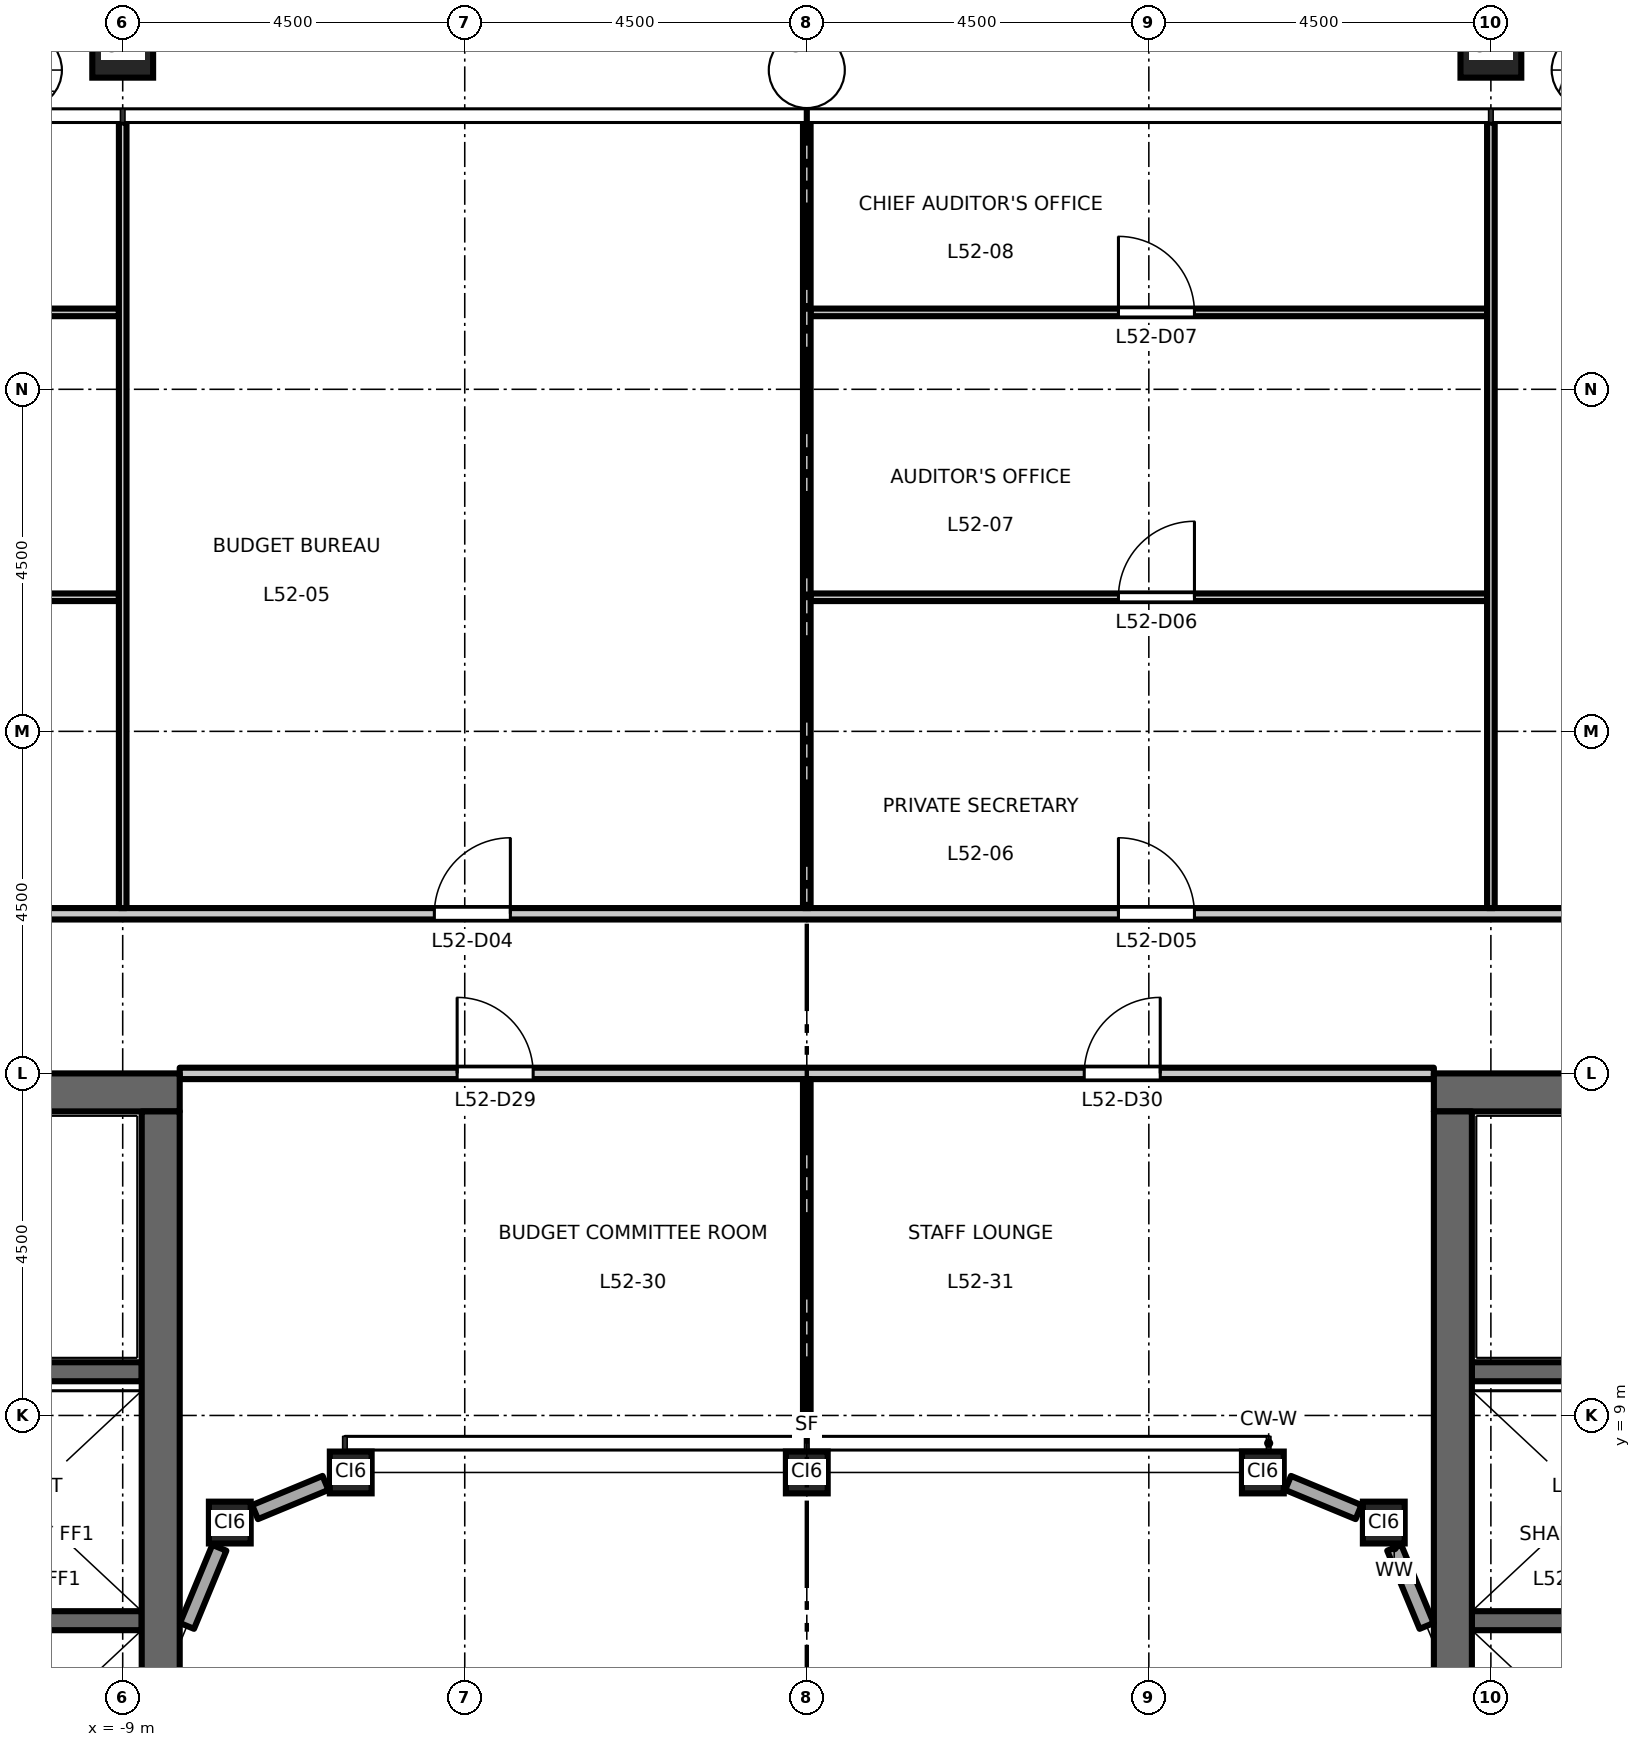
"""IFC4 building model, lengths in metres.
Left out: names, types, materials, properties, quantities, classifications, styles, units other than length and angle.
Written with IfcOpenShell. Run it as: python <this file> out.ifc"""

import sys

from ifc_helpers import new_model, si_unit, direction, frame, frame_2d, origin, origin_2d, place, context, subcontext, project, spatial, rectangle, hollow_rectangle, extrude, element, fill, save


model = new_model("IFC4")
c1 = context("Model", 3, precision=1e-05, world=origin(), true_north=direction((0.0, 1.0)))
c2 = subcontext(c1, "Body", "Model", "MODEL_VIEW")
j1 = project(units=[si_unit("LENGTHUNIT", "METRE"), si_unit("PLANEANGLEUNIT", "RADIAN")], contexts=[c1])
p1 = place(None, origin())
s1 = spatial("IfcSite", under=j1, at=p1, CompositionType="ELEMENT")
p2 = place(p1, origin())
s2 = spatial("IfcBuilding", under=s1, at=p2, CompositionType="ELEMENT")
p3 = place(p2, frame((0.0, 0.0, 242.2)))
s3 = spatial("IfcBuildingStorey", under=s2, at=p3, CompositionType="ELEMENT", Elevation=242.2)
for number, where, z_axis, x_axis in (
    (1, (9.0, 27.0, 0.0), (0.0, 0.0, 1.0), (1.0, 0.0, 0.0)),
    (2, (0.0, 27.0, 0.0), (0.0, 0.0, 1.0), (1.0, 0.0, 0.0)),
    (3, (-9.0, 27.0, 0.0), (0.0, 0.0, 1.0), (1.0, 0.0, 0.0)),
):
    element("IfcColumn", number, at=place(p3, frame(where, z_axis=z_axis, x_axis=x_axis)), inside=s3, PredefinedType="COLUMN", context=c2, shape_type="SweptSolid", body=[
        extrude(hollow_rectangle(XDim=0.8, YDim=0.8, WallThickness=0.045, at=origin_2d()), origin(), (0.0, 0.0, 1.0), 4.5),
    ])
for number, where, z_axis, x_axis in (
    (4, (-7.591, 7.591, 0.0), (0.0, 0.0, 1.0), (1.0, 0.0, 0.0)),
    (5, (-6.0, 8.25, 0.0), (0.0, 0.0, 1.0), (1.0, 0.0, 0.0)),
    (6, (0.0, 8.25, 0.0), (0.0, 0.0, 1.0), (1.0, 0.0, 0.0)),
    (7, (6.0, 8.25, 0.0), (0.0, 0.0, 1.0), (1.0, 0.0, 0.0)),
    (8, (7.591, 7.591, 0.0), (0.0, 0.0, 1.0), (1.0, 0.0, 0.0)),
):
    element("IfcColumn", number, at=place(p3, frame(where, z_axis=z_axis, x_axis=x_axis)), inside=s3, PredefinedType="COLUMN", context=c2, shape_type="SweptSolid", body=[
        extrude(hollow_rectangle(XDim=0.55, YDim=0.55, WallThickness=0.028, at=origin_2d()), origin(), (0.0, 0.0, 1.0), 4.5),
    ])
p4 = place(p3, frame((-8.75, 6.3, 0.0), z_axis=(0.0, 0.0, 1.0), x_axis=(-1.0, 0.0, 0.0)))
e9 = element("IfcWall", 9, at=p4, inside=s3, PredefinedType="SHEAR", context=c2, shape_type="SweptSolid", body=[
    extrude(rectangle(XDim=3.1, YDim=0.25, at=frame_2d((1.55, 0.0))), origin(), (0.0, 0.0, 1.0), 4.35),
])
p5 = place(p3, frame((-8.75, 9.575, 0.0), z_axis=(0.0, 0.0, 1.0), x_axis=(-1.0, 0.0, 0.0)))
e10 = element("IfcWall", 10, at=p5, inside=s3, PredefinedType="SHEAR", context=c2, shape_type="SweptSolid", body=[
    extrude(rectangle(XDim=8.0, YDim=0.25, at=frame_2d((4.0, 0.0))), origin(), (0.0, 0.0, 1.0), 4.35),
])
p6 = place(p5, frame((6.65, 0.0, 0.0)))
e11 = element("IfcOpeningElement", 11, at=p6, cuts=e10, PredefinedType="OPENING", context=c2, shape_type="SweptSolid", body=[
    extrude(rectangle(XDim=1.1, YDim=2.1, at=frame_2d((0.55, 1.05))), frame((0.0, 0.135, 0.0), z_axis=(0.0, -1.0, 0.0), x_axis=(1.0, 0.0, 0.0)), (0.0, 0.0, 1.0), 0.27),
])
p7 = place(p3, frame((-8.25, 13.25, 0.0), z_axis=(0.0, 0.0, 1.0), x_axis=(-1.0, 0.0, 0.0)))
e12 = element("IfcWall", 12, at=p7, inside=s3, PredefinedType="SHEAR", context=c2, shape_type="SweptSolid", body=[
    extrude(rectangle(XDim=13.5, YDim=0.5, at=frame_2d((6.75, 0.0))), origin(), (0.0, 0.0, 1.0), 4.35),
])
p8 = place(p3, frame((-8.5, -13.0, 0.0), z_axis=(0.0, 0.0, 1.0), x_axis=(0.0, 1.0, 0.0)))
e13 = element("IfcWall", 13, at=p8, inside=s3, PredefinedType="SHEAR", context=c2, shape_type="SweptSolid", body=[
    extrude(rectangle(XDim=26.0, YDim=0.5, at=frame_2d((13.0, 0.0))), origin(), (0.0, 0.0, 1.0), 4.35),
])
p9 = place(p3, frame((8.75, 6.3, 0.0), z_axis=(0.0, 0.0, 1.0), x_axis=(1.0, 0.0, 0.0)))
e14 = element("IfcWall", 14, at=p9, inside=s3, PredefinedType="SHEAR", context=c2, shape_type="SweptSolid", body=[
    extrude(rectangle(XDim=3.1, YDim=0.25, at=frame_2d((1.55, 0.0))), origin(), (0.0, 0.0, 1.0), 4.35),
])
p10 = place(p3, frame((8.75, 9.575, 0.0), z_axis=(0.0, 0.0, 1.0), x_axis=(1.0, 0.0, 0.0)))
e15 = element("IfcWall", 15, at=p10, inside=s3, PredefinedType="SHEAR", context=c2, shape_type="SweptSolid", body=[
    extrude(rectangle(XDim=8.0, YDim=0.25, at=frame_2d((4.0, 0.0))), origin(), (0.0, 0.0, 1.0), 4.35),
])
p11 = place(p10, frame((6.65, 0.0, 0.0)))
e16 = element("IfcOpeningElement", 16, at=p11, cuts=e15, PredefinedType="OPENING", context=c2, shape_type="SweptSolid", body=[
    extrude(rectangle(XDim=1.1, YDim=2.1, at=frame_2d((0.55, 1.05))), frame((0.0, 0.135, 0.0), z_axis=(0.0, -1.0, 0.0), x_axis=(1.0, 0.0, 0.0)), (0.0, 0.0, 1.0), 0.27),
])
p12 = place(p3, frame((8.25, 13.25, 0.0), z_axis=(0.0, 0.0, 1.0), x_axis=(1.0, 0.0, 0.0)))
e17 = element("IfcWall", 17, at=p12, inside=s3, PredefinedType="SHEAR", context=c2, shape_type="SweptSolid", body=[
    extrude(rectangle(XDim=13.5, YDim=0.5, at=frame_2d((6.75, 0.0))), origin(), (0.0, 0.0, 1.0), 4.35),
])
p13 = place(p3, frame((8.5, -13.0, 0.0), z_axis=(0.0, 0.0, 1.0), x_axis=(0.0, 1.0, 0.0)))
e18 = element("IfcWall", 18, at=p13, inside=s3, PredefinedType="SHEAR", context=c2, shape_type="SweptSolid", body=[
    extrude(rectangle(XDim=26.0, YDim=0.5, at=frame_2d((13.0, 0.0))), origin(), (0.0, 0.0, 1.0), 4.35),
])
p14 = place(p3, frame((8.154, 6.231, 0.0), z_axis=(0.0, 0.0, 1.0), x_axis=(-0.382635994082, 0.923899180665, 0.0)))
e19 = element("IfcWall", 19, at=p14, inside=s3, PredefinedType="STANDARD", context=c2, shape_type="SweptSolid", body=[
    extrude(rectangle(XDim=1.113, YDim=0.2, at=frame_2d((0.556, 0.0))), origin(), (0.0, 0.0, 1.0), 3.918),
])
for number, where, z_axis, x_axis in (
    (20, (7.259, 7.729, 0.0), (0.0, 0.0, 1.0), (-0.924, 0.383, 0.0)),
    (21, (-6.332, 8.113, 0.0), (0.0, 0.0, 1.0), (-0.924, -0.383, 0.0)),
):
    element("IfcWall", number, at=place(p3, frame(where, z_axis=z_axis, x_axis=x_axis)), inside=s3, PredefinedType="STANDARD", context=c2, shape_type="SweptSolid", body=[
        extrude(rectangle(XDim=1.003, YDim=0.2, at=frame_2d((0.502, 0.0))), origin(), (0.0, 0.0, 1.0), 3.918),
    ])
p15 = place(p3, frame((-7.729, 7.259, 0.0), z_axis=(0.0, 0.0, 1.0), x_axis=(-0.382635994082, -0.923899180665, 0.0)))
e22 = element("IfcWall", 22, at=p15, inside=s3, PredefinedType="STANDARD", context=c2, shape_type="SweptSolid", body=[
    extrude(rectangle(XDim=1.113, YDim=0.2, at=frame_2d((0.556, 0.0))), origin(), (0.0, 0.0, 1.0), 3.918),
])
p16 = place(p3, frame((-8.25, 13.5, 0.0), z_axis=(0.0, 0.0, 1.0), x_axis=(1.0, 0.0, 0.0)))
e23 = element("IfcWall", 23, at=p16, inside=s3, PredefinedType="PARTITIONING", context=c2, shape_type="SweptSolid", body=[
    extrude(rectangle(XDim=16.5, YDim=0.15, at=frame_2d((8.25, 0.0))), origin(), (0.0, 0.0, 1.0), 4.35),
])
p17 = place(p16, frame((3.65, 0.0, 0.0)))
e24 = element("IfcOpeningElement", 24, at=p17, cuts=e23, PredefinedType="OPENING", context=c2, shape_type="SweptSolid", body=[
    extrude(rectangle(XDim=1.0, YDim=2.1, at=frame_2d((0.5, 1.05))), frame((0.0, 0.085, 0.0), z_axis=(0.0, -1.0, 0.0), x_axis=(1.0, 0.0, 0.0)), (0.0, 0.0, 1.0), 0.17),
])
p18 = place(p16, frame((11.9, 0.0, 0.0)))
e25 = element("IfcOpeningElement", 25, at=p18, cuts=e23, PredefinedType="OPENING", context=c2, shape_type="SweptSolid", body=[
    extrude(rectangle(XDim=1.0, YDim=2.1, at=frame_2d((0.5, 1.05))), frame((0.0, 0.085, 0.0), z_axis=(0.0, -1.0, 0.0), x_axis=(1.0, 0.0, 0.0)), (0.0, 0.0, 1.0), 0.17),
])
p19 = place(p3, frame((-23.925, 15.6, 0.0), z_axis=(0.0, 0.0, 1.0), x_axis=(1.0, 0.0, 0.0)))
e26 = element("IfcWall", 26, at=p19, inside=s3, PredefinedType="PARTITIONING", context=c2, shape_type="SweptSolid", body=[
    extrude(rectangle(XDim=47.85, YDim=0.15, at=frame_2d((23.925, 0.0))), origin(), (0.0, 0.0, 1.0), 4.35),
])
p20 = place(p19, frame((10.025, 0.0, 0.0)))
e27 = element("IfcOpeningElement", 27, at=p20, cuts=e26, PredefinedType="OPENING", context=c2, shape_type="SweptSolid", body=[
    extrude(rectangle(XDim=1.0, YDim=2.1, at=frame_2d((0.5, 1.05))), frame((0.0, 0.085, 0.0), z_axis=(0.0, -1.0, 0.0), x_axis=(1.0, 0.0, 0.0)), (0.0, 0.0, 1.0), 0.17),
])
p21 = place(p19, frame((19.025, 0.0, 0.0)))
e28 = element("IfcOpeningElement", 28, at=p21, cuts=e26, PredefinedType="OPENING", context=c2, shape_type="SweptSolid", body=[
    extrude(rectangle(XDim=1.0, YDim=2.1, at=frame_2d((0.5, 1.05))), frame((0.0, 0.085, 0.0), z_axis=(0.0, -1.0, 0.0), x_axis=(1.0, 0.0, 0.0)), (0.0, 0.0, 1.0), 0.17),
])
p22 = place(p19, frame((28.025, 0.0, 0.0)))
e29 = element("IfcOpeningElement", 29, at=p22, cuts=e26, PredefinedType="OPENING", context=c2, shape_type="SweptSolid", body=[
    extrude(rectangle(XDim=1.0, YDim=2.1, at=frame_2d((0.5, 1.05))), frame((0.0, 0.085, 0.0), z_axis=(0.0, -1.0, 0.0), x_axis=(1.0, 0.0, 0.0)), (0.0, 0.0, 1.0), 0.17),
])
p23 = place(p19, frame((37.025, 0.0, 0.0)))
e30 = element("IfcOpeningElement", 30, at=p23, cuts=e26, PredefinedType="OPENING", context=c2, shape_type="SweptSolid", body=[
    extrude(rectangle(XDim=1.0, YDim=2.1, at=frame_2d((0.5, 1.05))), frame((0.0, 0.085, 0.0), z_axis=(0.0, -1.0, 0.0), x_axis=(1.0, 0.0, 0.0)), (0.0, 0.0, 1.0), 0.17),
])
p24 = place(p19, frame((2.525, 0.0, 0.0)))
e31 = element("IfcOpeningElement", 31, at=p24, cuts=e26, PredefinedType="OPENING", context=c2, shape_type="SweptSolid", body=[
    extrude(rectangle(XDim=1.0, YDim=2.1, at=frame_2d((0.5, 1.05))), frame((0.0, 0.085, 0.0), z_axis=(0.0, -1.0, 0.0), x_axis=(1.0, 0.0, 0.0)), (0.0, 0.0, 1.0), 0.17),
])
p25 = place(p19, frame((44.375, 0.0, 0.0)))
e32 = element("IfcOpeningElement", 32, at=p25, cuts=e26, PredefinedType="OPENING", context=c2, shape_type="SweptSolid", body=[
    extrude(rectangle(XDim=1.0, YDim=2.1, at=frame_2d((0.5, 1.05))), frame((0.0, 0.085, 0.0), z_axis=(0.0, -1.0, 0.0), x_axis=(1.0, 0.0, 0.0)), (0.0, 0.0, 1.0), 0.17),
])
p26 = place(p3, frame((-17.95, 19.764, 0.0), z_axis=(0.0, 0.0, 1.0), x_axis=(1.0, 0.0, 0.0)))
e33 = element("IfcWall", 33, at=p26, inside=s3, PredefinedType="PARTITIONING", context=c2, shape_type="SweptSolid", body=[
    extrude(rectangle(XDim=8.9, YDim=0.1, at=frame_2d((4.45, 0.0))), origin(), (0.0, 0.0, 1.0), 4.35),
])
p27 = place(p26, frame((4.05, 0.0, 0.0)))
e34 = element("IfcOpeningElement", 34, at=p27, cuts=e33, PredefinedType="OPENING", context=c2, shape_type="SweptSolid", body=[
    extrude(rectangle(XDim=1.0, YDim=2.1, at=frame_2d((0.5, 1.05))), frame((0.0, 0.06, 0.0), z_axis=(0.0, -1.0, 0.0), x_axis=(1.0, 0.0, 0.0)), (0.0, 0.0, 1.0), 0.12),
])
p28 = place(p3, frame((0.05, 19.764, 0.0), z_axis=(0.0, 0.0, 1.0), x_axis=(1.0, 0.0, 0.0)))
e35 = element("IfcWall", 35, at=p28, inside=s3, PredefinedType="PARTITIONING", context=c2, shape_type="SweptSolid", body=[
    extrude(rectangle(XDim=8.9, YDim=0.1, at=frame_2d((4.45, 0.0))), origin(), (0.0, 0.0, 1.0), 4.35),
])
p29 = place(p28, frame((4.05, 0.0, 0.0)))
e36 = element("IfcOpeningElement", 36, at=p29, cuts=e35, PredefinedType="OPENING", context=c2, shape_type="SweptSolid", body=[
    extrude(rectangle(XDim=1.0, YDim=2.1, at=frame_2d((0.5, 1.05))), frame((0.0, 0.06, 0.0), z_axis=(0.0, -1.0, 0.0), x_axis=(1.0, 0.0, 0.0)), (0.0, 0.0, 1.0), 0.12),
])
p30 = place(p3, frame((-17.95, 23.512, 0.0), z_axis=(0.0, 0.0, 1.0), x_axis=(1.0, 0.0, 0.0)))
e37 = element("IfcWall", 37, at=p30, inside=s3, PredefinedType="PARTITIONING", context=c2, shape_type="SweptSolid", body=[
    extrude(rectangle(XDim=8.9, YDim=0.1, at=frame_2d((4.45, 0.0))), origin(), (0.0, 0.0, 1.0), 4.35),
])
p31 = place(p30, frame((4.05, 0.0, 0.0)))
e38 = element("IfcOpeningElement", 38, at=p31, cuts=e37, PredefinedType="OPENING", context=c2, shape_type="SweptSolid", body=[
    extrude(rectangle(XDim=1.0, YDim=2.1, at=frame_2d((0.5, 1.05))), frame((0.0, 0.06, 0.0), z_axis=(0.0, -1.0, 0.0), x_axis=(1.0, 0.0, 0.0)), (0.0, 0.0, 1.0), 0.12),
])
p32 = place(p3, frame((0.05, 23.512, 0.0), z_axis=(0.0, 0.0, 1.0), x_axis=(1.0, 0.0, 0.0)))
e39 = element("IfcWall", 39, at=p32, inside=s3, PredefinedType="PARTITIONING", context=c2, shape_type="SweptSolid", body=[
    extrude(rectangle(XDim=8.9, YDim=0.1, at=frame_2d((4.45, 0.0))), origin(), (0.0, 0.0, 1.0), 4.35),
])
p33 = place(p32, frame((4.05, 0.0, 0.0)))
e40 = element("IfcOpeningElement", 40, at=p33, cuts=e39, PredefinedType="OPENING", context=c2, shape_type="SweptSolid", body=[
    extrude(rectangle(XDim=1.0, YDim=2.1, at=frame_2d((0.5, 1.05))), frame((0.0, 0.06, 0.0), z_axis=(0.0, -1.0, 0.0), x_axis=(1.0, 0.0, 0.0)), (0.0, 0.0, 1.0), 0.12),
])
p34 = place(p3, frame((-9.0, 15.675, 0.0), z_axis=(0.0, 0.0, 1.0), x_axis=(0.0, 1.0, 0.0)))
e41 = element("IfcWall", 41, at=p34, inside=s3, PredefinedType="PARTITIONING", context=c2, shape_type="SweptSolid", body=[
    extrude(rectangle(XDim=10.335, YDim=0.1, at=frame_2d((5.167, 0.0))), origin(), (0.0, 0.0, 1.0), 3.65),
])
p35 = place(p3, frame((0.0, 8.6, 0.0), z_axis=(0.0, 0.0, 1.0), x_axis=(0.0, 1.0, 0.0)))
e42 = element("IfcWall", 42, at=p35, inside=s3, PredefinedType="PARTITIONING", context=c2, shape_type="SweptSolid", body=[
    extrude(rectangle(XDim=4.825, YDim=0.1, at=frame_2d((2.413, 0.0))), origin(), (0.0, 0.0, 1.0), 3.55),
])
p36 = place(p3, frame((0.0, 15.675, 0.0), z_axis=(0.0, 0.0, 1.0), x_axis=(0.0, 1.0, 0.0)))
e43 = element("IfcWall", 43, at=p36, inside=s3, PredefinedType="PARTITIONING", context=c2, shape_type="SweptSolid", body=[
    extrude(rectangle(XDim=10.335, YDim=0.1, at=frame_2d((5.167, 0.0))), origin(), (0.0, 0.0, 1.0), 3.55),
])
p37 = place(p3, frame((9.0, 15.675, 0.0), z_axis=(0.0, 0.0, 1.0), x_axis=(0.0, 1.0, 0.0)))
e44 = element("IfcWall", 44, at=p37, inside=s3, PredefinedType="PARTITIONING", context=c2, shape_type="SweptSolid", body=[
    extrude(rectangle(XDim=10.335, YDim=0.1, at=frame_2d((5.167, 0.0))), origin(), (0.0, 0.0, 1.0), 3.65),
])
p38 = place(p21, origin())
e45 = element("IfcDoor", 45, at=p38, inside=s3, OperationType="SINGLE_SWING_RIGHT", PredefinedType="DOOR", context=c2, shape_type="SweptSolid", body=[
    extrude(rectangle(XDim=1.0, YDim=2.1, at=frame_2d((0.5, 1.05))), frame((0.0, 0.025, 0.0), z_axis=(0.0, -1.0, 0.0), x_axis=(1.0, 0.0, 0.0)), (0.0, 0.0, 1.0), 0.05),
])
fill(e28, e45)
p39 = place(p22, origin())
e46 = element("IfcDoor", 46, at=p39, inside=s3, OperationType="SINGLE_SWING_LEFT", PredefinedType="DOOR", context=c2, shape_type="SweptSolid", body=[
    extrude(rectangle(XDim=1.0, YDim=2.1, at=frame_2d((0.5, 1.05))), frame((0.0, 0.025, 0.0), z_axis=(0.0, -1.0, 0.0), x_axis=(1.0, 0.0, 0.0)), (0.0, 0.0, 1.0), 0.05),
])
fill(e29, e46)
p40 = place(p29, origin())
e47 = element("IfcDoor", 47, at=p40, inside=s3, OperationType="SINGLE_SWING_RIGHT", PredefinedType="DOOR", context=c2, shape_type="SweptSolid", body=[
    extrude(rectangle(XDim=1.0, YDim=2.1, at=frame_2d((0.5, 1.05))), frame((0.0, 0.025, 0.0), z_axis=(0.0, -1.0, 0.0), x_axis=(1.0, 0.0, 0.0)), (0.0, 0.0, 1.0), 0.05),
])
fill(e36, e47)
p41 = place(p33, origin())
e48 = element("IfcDoor", 48, at=p41, inside=s3, OperationType="SINGLE_SWING_LEFT", PredefinedType="DOOR", context=c2, shape_type="SweptSolid", body=[
    extrude(rectangle(XDim=1.0, YDim=2.1, at=frame_2d((0.5, 1.05))), frame((0.0, 0.025, 0.0), z_axis=(0.0, -1.0, 0.0), x_axis=(1.0, 0.0, 0.0)), (0.0, 0.0, 1.0), 0.05),
])
fill(e40, e48)
p42 = place(p17, origin())
e49 = element("IfcDoor", 49, at=p42, inside=s3, OperationType="SINGLE_SWING_LEFT", PredefinedType="DOOR", context=c2, shape_type="SweptSolid", body=[
    extrude(rectangle(XDim=1.0, YDim=2.1, at=frame_2d((0.5, 1.05))), frame((0.0, 0.025, 0.0), z_axis=(0.0, -1.0, 0.0), x_axis=(1.0, 0.0, 0.0)), (0.0, 0.0, 1.0), 0.05),
])
fill(e24, e49)
p43 = place(p18, origin())
e50 = element("IfcDoor", 50, at=p43, inside=s3, OperationType="SINGLE_SWING_RIGHT", PredefinedType="DOOR", context=c2, shape_type="SweptSolid", body=[
    extrude(rectangle(XDim=1.0, YDim=2.1, at=frame_2d((0.5, 1.05))), frame((0.0, 0.025, 0.0), z_axis=(0.0, -1.0, 0.0), x_axis=(1.0, 0.0, 0.0)), (0.0, 0.0, 1.0), 0.05),
])
fill(e25, e50)
save(model, sys.argv[1])
